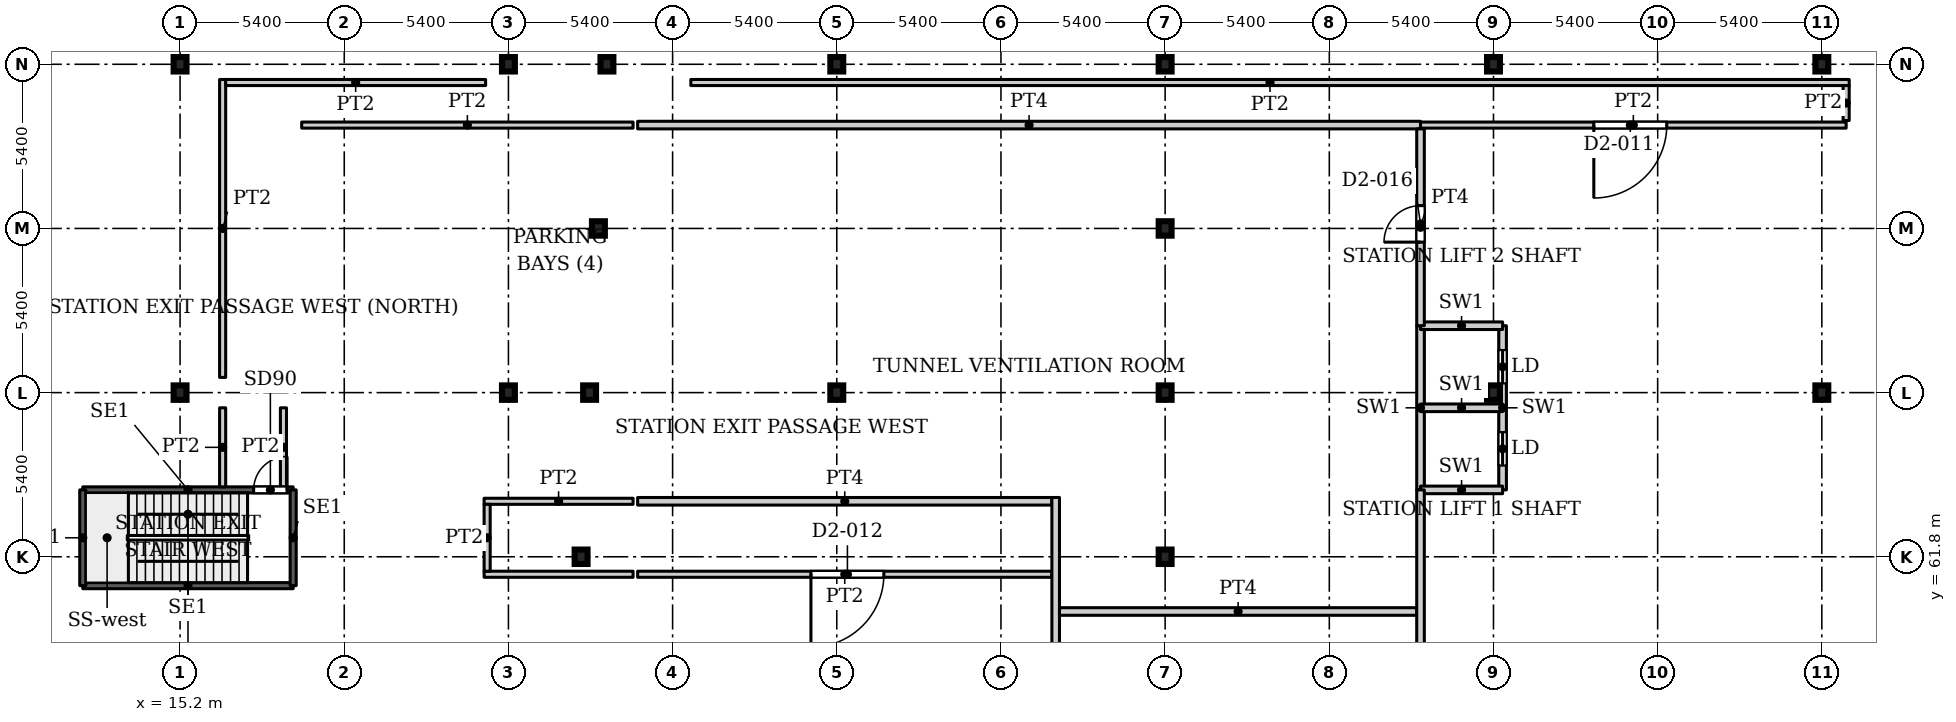
"""IFC4 building model, lengths in metres.
Left out: names, types, materials, properties, quantities, classifications, styles, units other than length and angle.
Written with IfcOpenShell. Run it as: python <this file> out.ifc"""

import sys

from ifc_helpers import new_model, si_unit, direction, frame, frame_2d, origin, origin_2d, place, context, subcontext, project, spatial, rectangle, i_section, extrude, source, transform, mapped, element, fill, save


model = new_model("IFC4")
c1 = context("Model", 3, precision=1e-05, world=origin(), true_north=direction((0.0, 1.0)))
c2 = subcontext(c1, "Body", "Model", "MODEL_VIEW")
j1 = project(units=[si_unit("LENGTHUNIT", "METRE"), si_unit("PLANEANGLEUNIT", "RADIAN")], contexts=[c1])
p1 = place(None, origin())
s1 = spatial("IfcSite", under=j1, at=p1, CompositionType="ELEMENT")
p2 = place(p1, origin())
s2 = spatial("IfcBuilding", under=s1, at=p2, CompositionType="ELEMENT")
p3 = place(p2, frame((0.0, 0.0, -10.0)))
s3 = spatial("IfcBuildingStorey", under=s2, at=p3, CompositionType="ELEMENT", Elevation=-10.0)
for number, where, z_axis, x_axis in (
    (1, (15.2, 67.2, 0.0), (0.0, 0.0, 1.0), (1.0, 0.0, 0.0)),
    (2, (26.0, 67.2, 0.0), (0.0, 0.0, 1.0), (1.0, 0.0, 0.0)),
    (3, (36.8, 67.2, 0.0), (0.0, 0.0, 1.0), (1.0, 0.0, 0.0)),
    (4, (47.6, 67.2, 0.0), (0.0, 0.0, 1.0), (1.0, 0.0, 0.0)),
    (5, (58.4, 67.2, 0.0), (0.0, 0.0, 1.0), (1.0, 0.0, 0.0)),
    (6, (69.2, 67.2, 0.0), (0.0, 0.0, 1.0), (1.0, 0.0, 0.0)),
    (7, (15.2, 78.0, 0.0), (0.0, 0.0, 1.0), (1.0, 0.0, 0.0)),
    (8, (26.0, 78.0, 0.0), (0.0, 0.0, 1.0), (1.0, 0.0, 0.0)),
    (9, (36.8, 78.0, 0.0), (0.0, 0.0, 1.0), (1.0, 0.0, 0.0)),
    (10, (47.6, 78.0, 0.0), (0.0, 0.0, 1.0), (1.0, 0.0, 0.0)),
    (11, (58.4, 78.0, 0.0), (0.0, 0.0, 1.0), (1.0, 0.0, 0.0)),
    (12, (69.2, 78.0, 0.0), (0.0, 0.0, 1.0), (1.0, 0.0, 0.0)),
    (13, (28.39, 61.8, 0.0), (0.0, 0.0, 1.0), (1.0, 0.0, 0.0)),
    (14, (47.6, 61.8, 0.0), (0.0, 0.0, 1.0), (1.0, 0.0, 0.0)),
    (15, (28.67, 67.2, 0.0), (0.0, 0.0, 1.0), (1.0, 0.0, 0.0)),
    (16, (28.96, 72.6, 0.0), (0.0, 0.0, 1.0), (1.0, 0.0, 0.0)),
    (17, (47.6, 72.6, 0.0), (0.0, 0.0, 1.0), (1.0, 0.0, 0.0)),
    (18, (29.24, 78.0, 0.0), (0.0, 0.0, 1.0), (1.0, 0.0, 0.0)),
):
    element("IfcColumn", number, at=place(p3, frame(where, z_axis=z_axis, x_axis=x_axis)), inside=s3, PredefinedType="COLUMN", context=c2, shape_type="SweptSolid", body=[
        extrude(i_section(OverallWidth=0.424, OverallDepth=0.474, WebThickness=0.048, FlangeThickness=0.077, FilletRadius=0.014, at=origin_2d()), origin(), (0.0, 0.0, 1.0), 5.0),
    ])
p4 = place(p3, frame((56.0, 64.0, 0.0), z_axis=(0.0, 0.0, 1.0), x_axis=(0.0, 1.0, 0.0)))
e19 = element("IfcWall", 19, at=p4, inside=s3, PredefinedType="PARTITIONING", context=c2, shape_type="SweptSolid", body=[
    extrude(rectangle(XDim=5.4, YDim=0.25, at=frame_2d((2.7, 0.0))), origin(), (0.0, 0.0, 1.0), 5.0),
])
p5 = place(p3, frame((58.7, 64.0, 0.0), z_axis=(0.0, 0.0, 1.0), x_axis=(0.0, 1.0, 0.0)))
e20 = element("IfcWall", 20, at=p5, inside=s3, PredefinedType="PARTITIONING", context=c2, shape_type="SweptSolid", body=[
    extrude(rectangle(XDim=5.4, YDim=0.25, at=frame_2d((2.7, 0.0))), origin(), (0.0, 0.0, 1.0), 5.0),
])
p6 = place(p5, frame((0.8, 0.0, 0.0)))
e21 = element("IfcOpeningElement", 21, at=p6, cuts=e20, PredefinedType="OPENING", context=c2, shape_type="SweptSolid", body=[
    extrude(rectangle(XDim=1.1, YDim=2.2, at=frame_2d((0.55, 1.1))), frame((0.0, 0.135, 0.0), z_axis=(0.0, -1.0, 0.0), x_axis=(1.0, 0.0, 0.0)), (0.0, 0.0, 1.0), 0.27),
])
p7 = place(p5, frame((3.5, 0.0, 0.0)))
e22 = element("IfcOpeningElement", 22, at=p7, cuts=e20, PredefinedType="OPENING", context=c2, shape_type="SweptSolid", body=[
    extrude(rectangle(XDim=1.1, YDim=2.2, at=frame_2d((0.55, 1.1))), frame((0.0, 0.135, 0.0), z_axis=(0.0, -1.0, 0.0), x_axis=(1.0, 0.0, 0.0)), (0.0, 0.0, 1.0), 0.27),
])
for number, where, z_axis, x_axis in (
    (23, (56.0, 64.0, 0.0), (0.0, 0.0, 1.0), (1.0, 0.0, 0.0)),
    (24, (56.0, 66.7, 0.0), (0.0, 0.0, 1.0), (1.0, 0.0, 0.0)),
    (25, (56.0, 69.4, 0.0), (0.0, 0.0, 1.0), (1.0, 0.0, 0.0)),
):
    element("IfcWall", number, at=place(p3, frame(where, z_axis=z_axis, x_axis=x_axis)), inside=s3, PredefinedType="PARTITIONING", context=c2, shape_type="SweptSolid", body=[
        extrude(rectangle(XDim=2.7, YDim=0.25, at=frame_2d((1.35, 0.0))), origin(), (0.0, 0.0, 1.0), 5.0),
    ])
p8 = place(p3, frame((12.0, 60.85, 0.0), z_axis=(0.0, 0.0, 1.0), x_axis=(1.0, 0.0, 0.0)))
e26 = element("IfcWall", 26, at=p8, inside=s3, PredefinedType="SHEAR", context=c2, shape_type="SweptSolid", body=[
    extrude(rectangle(XDim=6.92, YDim=0.2, at=frame_2d((3.46, 0.0))), origin(), (0.0, 0.0, 1.0), 5.0),
])
p9 = place(p3, frame((12.0, 64.0, 0.0), z_axis=(0.0, 0.0, 1.0), x_axis=(1.0, 0.0, 0.0)))
e27 = element("IfcWall", 27, at=p9, inside=s3, PredefinedType="SHEAR", context=c2, shape_type="SweptSolid", body=[
    extrude(rectangle(XDim=6.92, YDim=0.2, at=frame_2d((3.46, 0.0))), origin(), (0.0, 0.0, 1.0), 5.0),
])
p10 = place(p9, frame((5.62, 0.0, 0.0)))
e28 = element("IfcOpeningElement", 28, at=p10, cuts=e27, PredefinedType="OPENING", context=c2, shape_type="SweptSolid", body=[
    extrude(rectangle(XDim=1.1, YDim=2.2, at=frame_2d((0.55, 1.1))), frame((0.0, 0.11, 0.0), z_axis=(0.0, -1.0, 0.0), x_axis=(1.0, 0.0, 0.0)), (0.0, 0.0, 1.0), 0.22),
])
for number, where, z_axis, x_axis in (
    (29, (12.0, 60.85, 0.0), (0.0, 0.0, 1.0), (0.0, 1.0, 0.0)),
    (30, (18.92, 60.85, 0.0), (0.0, 0.0, 1.0), (0.0, 1.0, 0.0)),
):
    element("IfcWall", number, at=place(p3, frame(where, z_axis=z_axis, x_axis=x_axis)), inside=s3, PredefinedType="SHEAR", context=c2, shape_type="SweptSolid", body=[
        extrude(rectangle(XDim=3.15, YDim=0.2, at=frame_2d((1.575, 0.0))), origin(), (0.0, 0.0, 1.0), 5.0),
    ])
p11 = place(p3, frame((16.6, 64.1, 0.0), z_axis=(0.0, 0.0, 1.0), x_axis=(0.0, 1.0, 0.0)))
e31 = element("IfcWall", 31, at=p11, inside=s3, PredefinedType="PARTITIONING", context=c2, shape_type="SweptSolid", body=[
    extrude(rectangle(XDim=2.6, YDim=0.2, at=frame_2d((1.3, 0.0))), origin(), (0.0, 0.0, 1.0), 4.58),
])
p12 = place(p3, frame((16.6, 67.7, 0.0), z_axis=(0.0, 0.0, 1.0), x_axis=(0.0, 1.0, 0.0)))
e32 = element("IfcWall", 32, at=p12, inside=s3, PredefinedType="PARTITIONING", context=c2, shape_type="SweptSolid", body=[
    extrude(rectangle(XDim=9.8, YDim=0.2, at=frame_2d((4.9, 0.0))), origin(), (0.0, 0.0, 1.0), 4.58),
])
p13 = place(p3, frame((16.7, 77.4, 0.0), z_axis=(0.0, 0.0, 1.0), x_axis=(1.0, 0.0, 0.0)))
e33 = element("IfcWall", 33, at=p13, inside=s3, PredefinedType="PARTITIONING", context=c2, shape_type="SweptSolid", body=[
    extrude(rectangle(XDim=8.55, YDim=0.2, at=frame_2d((4.275, 0.0))), origin(), (0.0, 0.0, 1.0), 4.58),
])
p14 = place(p3, frame((18.6, 64.1, 0.0), z_axis=(0.0, 0.0, 1.0), x_axis=(0.0, 1.0, 0.0)))
e34 = element("IfcWall", 34, at=p14, inside=s3, PredefinedType="PARTITIONING", context=c2, shape_type="SweptSolid", body=[
    extrude(rectangle(XDim=2.6, YDim=0.2, at=frame_2d((1.3, 0.0))), origin(), (0.0, 0.0, 1.0), 4.58),
])
p15 = place(p3, frame((19.2, 76.0, 0.0), z_axis=(0.0, 0.0, 1.0), x_axis=(1.0, 0.0, 0.0)))
e35 = element("IfcWall", 35, at=p15, inside=s3, PredefinedType="PARTITIONING", context=c2, shape_type="SweptSolid", body=[
    extrude(rectangle(XDim=10.9, YDim=0.2, at=frame_2d((5.45, 0.0))), origin(), (0.0, 0.0, 1.0), 4.58),
])
for number, where, z_axis, x_axis in (
    (36, (25.2, 61.225, 0.0), (0.0, 0.0, 1.0), (1.0, 0.0, 0.0)),
    (37, (25.2, 63.625, 0.0), (0.0, 0.0, 1.0), (1.0, 0.0, 0.0)),
):
    element("IfcWall", number, at=place(p3, frame(where, z_axis=z_axis, x_axis=x_axis)), inside=s3, PredefinedType="PARTITIONING", context=c2, shape_type="SweptSolid", body=[
        extrude(rectangle(XDim=4.9, YDim=0.2, at=frame_2d((2.45, 0.0))), origin(), (0.0, 0.0, 1.0), 4.58),
    ])
p16 = place(p3, frame((25.3, 61.325, 0.0), z_axis=(0.0, 0.0, 1.0), x_axis=(0.0, 1.0, 0.0)))
e38 = element("IfcWall", 38, at=p16, inside=s3, PredefinedType="PARTITIONING", context=c2, shape_type="SweptSolid", body=[
    extrude(rectangle(XDim=2.2, YDim=0.2, at=frame_2d((1.1, 0.0))), origin(), (0.0, 0.0, 1.0), 4.58),
])
p17 = place(p3, frame((30.25, 61.225, 0.0), z_axis=(0.0, 0.0, 1.0), x_axis=(1.0, 0.0, 0.0)))
e39 = element("IfcWall", 39, at=p17, inside=s3, PredefinedType="PARTITIONING", context=c2, shape_type="SweptSolid", body=[
    extrude(rectangle(XDim=13.625, YDim=0.2, at=frame_2d((6.812, 0.0))), origin(), (0.0, 0.0, 1.0), 4.58),
])
p18 = place(p17, frame((5.7, 0.0, 0.0)))
e40 = element("IfcOpeningElement", 40, at=p18, cuts=e39, PredefinedType="OPENING", context=c2, shape_type="SweptSolid", body=[
    extrude(rectangle(XDim=2.4, YDim=2.1, at=frame_2d((1.2, 1.05))), frame((0.0, 0.11, 0.0), z_axis=(0.0, -1.0, 0.0), x_axis=(1.0, 0.0, 0.0)), (0.0, 0.0, 1.0), 0.22),
])
p19 = place(p3, frame((30.25, 63.625, 0.0), z_axis=(0.0, 0.0, 1.0), x_axis=(1.0, 0.0, 0.0)))
e41 = element("IfcWall", 41, at=p19, inside=s3, PredefinedType="PARTITIONING", context=c2, shape_type="SweptSolid", body=[
    extrude(rectangle(XDim=13.625, YDim=0.25, at=frame_2d((6.812, 0.0))), origin(), (0.0, 0.0, 1.0), 4.58),
])
p20 = place(p3, frame((30.25, 76.0, 0.0), z_axis=(0.0, 0.0, 1.0), x_axis=(1.0, 0.0, 0.0)))
e42 = element("IfcWall", 42, at=p20, inside=s3, PredefinedType="PARTITIONING", context=c2, shape_type="SweptSolid", body=[
    extrude(rectangle(XDim=25.75, YDim=0.25, at=frame_2d((12.875, 0.0))), origin(), (0.0, 0.0, 1.0), 4.58),
])
p21 = place(p3, frame((32.0, 77.4, 0.0), z_axis=(0.0, 0.0, 1.0), x_axis=(1.0, 0.0, 0.0)))
e43 = element("IfcWall", 43, at=p21, inside=s3, PredefinedType="PARTITIONING", context=c2, shape_type="SweptSolid", body=[
    extrude(rectangle(XDim=38.1, YDim=0.2, at=frame_2d((19.05, 0.0))), origin(), (0.0, 0.0, 1.0), 4.58),
])
p22 = place(p3, frame((44.0, 43.875, 0.0), z_axis=(0.0, 0.0, 1.0), x_axis=(0.0, 1.0, 0.0)))
e44 = element("IfcWall", 44, at=p22, inside=s3, PredefinedType="PARTITIONING", context=c2, shape_type="SweptSolid", body=[
    extrude(rectangle(XDim=19.875, YDim=0.25, at=frame_2d((9.938, 0.0))), origin(), (0.0, 0.0, 1.0), 4.58),
])
p23 = place(p22, frame((7.525, 0.0, 0.0)))
e45 = element("IfcOpeningElement", 45, at=p23, cuts=e44, PredefinedType="OPENING", context=c2, shape_type="SweptSolid", body=[
    extrude(rectangle(XDim=1.2, YDim=2.1, at=frame_2d((0.6, 1.05))), frame((0.0, 0.135, 0.0), z_axis=(0.0, -1.0, 0.0), x_axis=(1.0, 0.0, 0.0)), (0.0, 0.0, 1.0), 0.27),
])
p24 = place(p3, frame((44.125, 60.0, 0.0), z_axis=(0.0, 0.0, 1.0), x_axis=(1.0, 0.0, 0.0)))
e46 = element("IfcWall", 46, at=p24, inside=s3, PredefinedType="PARTITIONING", context=c2, shape_type="SweptSolid", body=[
    extrude(rectangle(XDim=11.75, YDim=0.25, at=frame_2d((5.875, 0.0))), origin(), (0.0, 0.0, 1.0), 4.58),
])
p25 = place(p3, frame((56.0, 43.875, 0.0), z_axis=(0.0, 0.0, 1.0), x_axis=(0.0, 1.0, 0.0)))
e47 = element("IfcWall", 47, at=p25, inside=s3, PredefinedType="PARTITIONING", context=c2, shape_type="SweptSolid", body=[
    extrude(rectangle(XDim=20.125, YDim=0.25, at=frame_2d((10.062, 0.0))), origin(), (0.0, 0.0, 1.0), 4.58),
])
p26 = place(p3, frame((56.0, 69.4, 0.0), z_axis=(0.0, 0.0, 1.0), x_axis=(0.0, 1.0, 0.0)))
e48 = element("IfcWall", 48, at=p26, inside=s3, PredefinedType="PARTITIONING", context=c2, shape_type="SweptSolid", body=[
    extrude(rectangle(XDim=6.475, YDim=0.25, at=frame_2d((3.238, 0.0))), origin(), (0.0, 0.0, 1.0), 4.58),
])
p27 = place(p26, frame((2.75, 0.0, 0.0)))
e49 = element("IfcOpeningElement", 49, at=p27, cuts=e48, PredefinedType="OPENING", context=c2, shape_type="SweptSolid", body=[
    extrude(rectangle(XDim=1.2, YDim=2.1, at=frame_2d((0.6, 1.05))), frame((0.0, 0.135, 0.0), z_axis=(0.0, -1.0, 0.0), x_axis=(1.0, 0.0, 0.0)), (0.0, 0.0, 1.0), 0.27),
])
p28 = place(p3, frame((56.0, 76.0, 0.0), z_axis=(0.0, 0.0, 1.0), x_axis=(1.0, 0.0, 0.0)))
e50 = element("IfcWall", 50, at=p28, inside=s3, PredefinedType="PARTITIONING", context=c2, shape_type="SweptSolid", body=[
    extrude(rectangle(XDim=14.0, YDim=0.2, at=frame_2d((7.0, 0.0))), origin(), (0.0, 0.0, 1.0), 4.58),
])
p29 = place(p28, frame((5.7, 0.0, 0.0)))
e51 = element("IfcOpeningElement", 51, at=p29, cuts=e50, PredefinedType="OPENING", context=c2, shape_type="SweptSolid", body=[
    extrude(rectangle(XDim=2.4, YDim=2.1, at=frame_2d((1.2, 1.05))), frame((0.0, 0.11, 0.0), z_axis=(0.0, -1.0, 0.0), x_axis=(1.0, 0.0, 0.0)), (0.0, 0.0, 1.0), 0.22),
])
p30 = place(p3, frame((70.0, 76.15, 0.0), z_axis=(0.0, 0.0, 1.0), x_axis=(0.0, 1.0, 0.0)))
e52 = element("IfcWall", 52, at=p30, inside=s3, PredefinedType="PARTITIONING", context=c2, shape_type="SweptSolid", body=[
    extrude(rectangle(XDim=1.15, YDim=0.2, at=frame_2d((0.575, 0.0))), origin(), (0.0, 0.0, 1.0), 4.58),
])
m1 = source(origin(), c2, "Body", "SweptSolid", [
    extrude(rectangle(XDim=1.1, YDim=2.2, at=frame_2d((0.55, 1.1))), frame((0.0, 0.025, 0.0), z_axis=(0.0, -1.0, 0.0), x_axis=(1.0, 0.0, 0.0)), (0.0, 0.0, 1.0), 0.05),
])
p31 = place(p6, origin())
e53 = element("IfcDoor", 53, at=p31, inside=s3, OperationType="SLIDING_TO_LEFT", PredefinedType="DOOR", context=c2, shape_type="MappedRepresentation", body=[
    mapped(m1, transform((0.0, 0.0, 0.0), x_axis=(1.0, 0.0, 0.0), y_axis=(0.0, 1.0, 0.0), z_axis=(0.0, 0.0, 1.0), scale=1.0)),
])
fill(e21, e53)
p32 = place(p7, origin())
e54 = element("IfcDoor", 54, at=p32, inside=s3, OperationType="SLIDING_TO_LEFT", PredefinedType="DOOR", context=c2, shape_type="MappedRepresentation", body=[
    mapped(m1, transform((0.0, 0.0, 0.0), x_axis=(1.0, 0.0, 0.0), y_axis=(0.0, 1.0, 0.0), z_axis=(0.0, 0.0, 1.0), scale=1.0)),
])
fill(e22, e54)
m2 = source(origin(), c2, "Body", "SweptSolid", [
    extrude(rectangle(XDim=1.1, YDim=2.2, at=frame_2d((0.55, 1.1))), frame((0.0, 0.025, 0.0), z_axis=(0.0, -1.0, 0.0), x_axis=(1.0, 0.0, 0.0)), (0.0, 0.0, 1.0), 0.05),
])
p33 = place(p10, origin())
e55 = element("IfcDoor", 55, at=p33, inside=s3, OperationType="SINGLE_SWING_LEFT", PredefinedType="DOOR", context=c2, shape_type="MappedRepresentation", body=[
    mapped(m2, transform((0.0, 0.0, 0.0), x_axis=(1.0, 0.0, 0.0), y_axis=(0.0, 1.0, 0.0), z_axis=(0.0, 0.0, 1.0), scale=1.0)),
])
fill(e28, e55)
m3 = source(origin(), c2, "Body", "SweptSolid", [
    extrude(rectangle(XDim=2.4, YDim=2.1, at=frame_2d((1.2, 1.05))), frame((0.0, 0.025, 0.0), z_axis=(0.0, -1.0, 0.0), x_axis=(1.0, 0.0, 0.0)), (0.0, 0.0, 1.0), 0.05),
])
p34 = place(p29, origin())
e56 = element("IfcDoor", 56, at=p34, inside=s3, OperationType="DOUBLE_DOOR_SINGLE_SWING", PredefinedType="DOOR", context=c2, shape_type="MappedRepresentation", body=[
    mapped(m3, transform((0.0, 0.0, 0.0), x_axis=(1.0, 0.0, 0.0), y_axis=(0.0, 1.0, 0.0), z_axis=(0.0, 0.0, 1.0), scale=1.0)),
])
fill(e51, e56)
p35 = place(p18, origin())
e57 = element("IfcDoor", 57, at=p35, inside=s3, OperationType="DOUBLE_DOOR_SINGLE_SWING", PredefinedType="DOOR", context=c2, shape_type="MappedRepresentation", body=[
    mapped(m3, transform((0.0, 0.0, 0.0), x_axis=(1.0, 0.0, 0.0), y_axis=(0.0, 1.0, 0.0), z_axis=(0.0, 0.0, 1.0), scale=1.0)),
])
fill(e40, e57)
m4 = source(origin(), c2, "Body", "SweptSolid", [
    extrude(rectangle(XDim=1.2, YDim=2.1, at=frame_2d((0.6, 1.05))), frame((0.0, 0.025, 0.0), z_axis=(0.0, -1.0, 0.0), x_axis=(1.0, 0.0, 0.0)), (0.0, 0.0, 1.0), 0.05),
])
p36 = place(p27, origin())
e58 = element("IfcDoor", 58, at=p36, inside=s3, OperationType="SINGLE_SWING_LEFT", PredefinedType="DOOR", context=c2, shape_type="MappedRepresentation", body=[
    mapped(m4, transform((0.0, 0.0, 0.0), x_axis=(1.0, 0.0, 0.0), y_axis=(0.0, 1.0, 0.0), z_axis=(0.0, 0.0, 1.0), scale=1.0)),
])
fill(e49, e58)
save(model, sys.argv[1])
